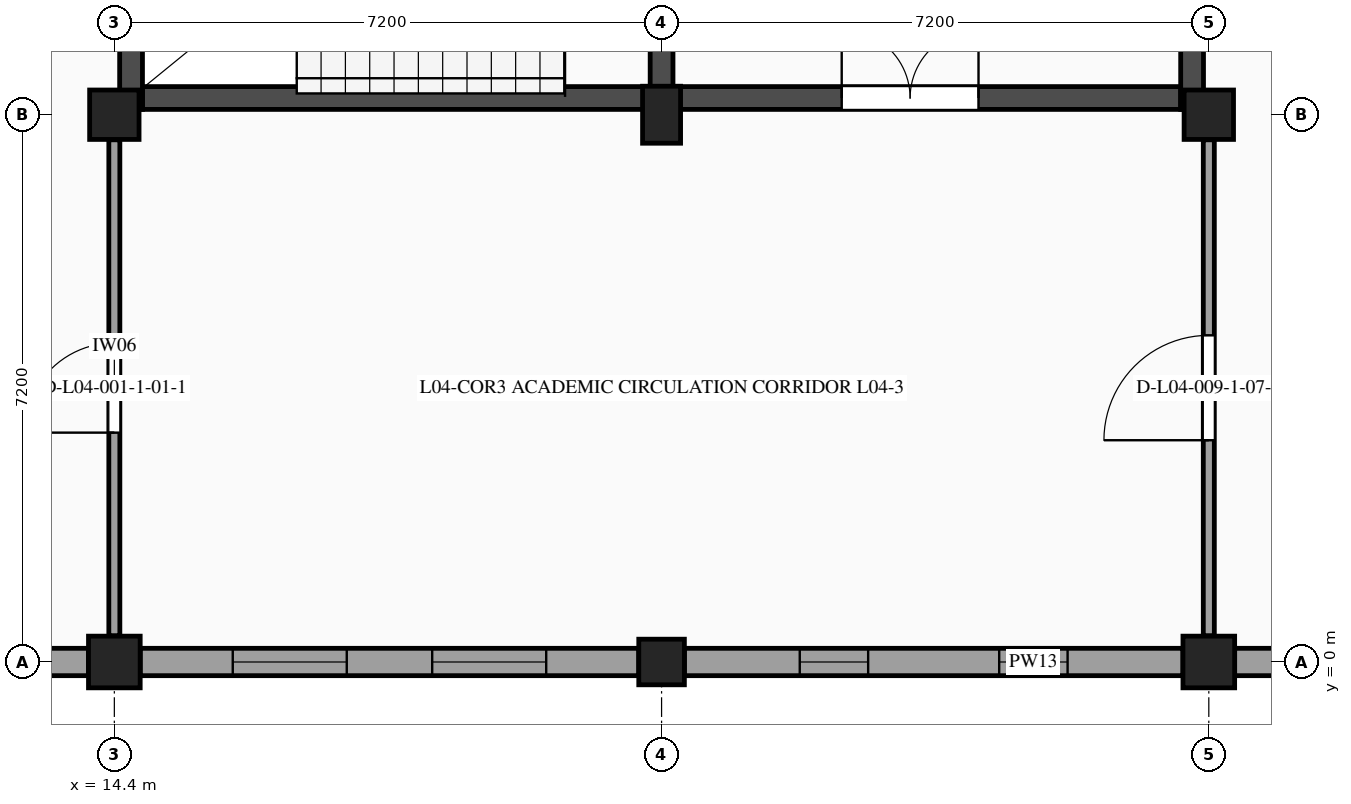
"""IFC4 building model, lengths in metres.
Left out: names, types, materials, properties, quantities, classifications, styles, units other than length and angle.
Written with IfcOpenShell. Run it as: python <this file> out.ifc"""

import sys

from ifc_helpers import new_model, si_unit, direction, frame, frame_2d, origin, origin_2d, place, context, subcontext, project, spatial, rectangle, extrude, element, fill, save


model = new_model("IFC4")
c1 = context("Model", 3, precision=1e-05, world=origin(), true_north=direction((0.0, 1.0)))
c2 = subcontext(c1, "Body", "Model", "MODEL_VIEW")
j1 = project(units=[si_unit("LENGTHUNIT", "METRE"), si_unit("PLANEANGLEUNIT", "RADIAN")], contexts=[c1])
p1 = place(None, origin())
s1 = spatial("IfcSite", under=j1, at=p1, CompositionType="ELEMENT")
p2 = place(p1, origin())
s2 = spatial("IfcBuilding", under=s1, at=p2, CompositionType="ELEMENT")
p3 = place(p2, frame((0.0, 0.0, 18.6)))
s3 = spatial("IfcBuildingStorey", under=s2, at=p3, CompositionType="ELEMENT", Elevation=18.6)
p4 = place(p3, frame((14.4, 0.0, 0.0), z_axis=(0.0, 0.0, 1.0), x_axis=(1.0, 0.0, 0.0)))
e1 = element("IfcColumn", 1, at=p4, inside=s3, PredefinedType="COLUMN", context=c2, shape_type="SweptSolid", body=[
    extrude(rectangle(XDim=0.68, YDim=0.68, at=origin_2d()), origin(), (0.0, 0.0, 1.0), 4.2),
])
p5 = place(p3, frame((14.4, 7.2, 0.0), z_axis=(0.0, 0.0, 1.0), x_axis=(1.0, 0.0, 0.0)))
e2 = element("IfcColumn", 2, at=p5, inside=s3, PredefinedType="COLUMN", context=c2, shape_type="SweptSolid", body=[
    extrude(rectangle(XDim=0.65, YDim=0.65, at=origin_2d()), origin(), (0.0, 0.0, 1.0), 4.2),
])
p6 = place(p3, frame((21.6, 0.0, 0.0), z_axis=(0.0, 0.0, 1.0), x_axis=(1.0, 0.0, 0.0)))
e3 = element("IfcColumn", 3, at=p6, inside=s3, PredefinedType="COLUMN", context=c2, shape_type="SweptSolid", body=[
    extrude(rectangle(XDim=0.6, YDim=0.6, at=origin_2d()), origin(), (0.0, 0.0, 1.0), 4.2),
])
p7 = place(p3, frame((21.6, 7.2, 0.0), z_axis=(0.0, 0.0, 1.0), x_axis=(1.0, 0.0, 0.0)))
e4 = element("IfcColumn", 4, at=p7, inside=s3, PredefinedType="COLUMN", context=c2, shape_type="SweptSolid", body=[
    extrude(rectangle(XDim=0.5, YDim=0.75, at=origin_2d()), origin(), (0.0, 0.0, 1.0), 4.2),
])
p8 = place(p3, frame((28.8, 0.0, 0.0), z_axis=(0.0, 0.0, 1.0), x_axis=(1.0, 0.0, 0.0)))
e5 = element("IfcColumn", 5, at=p8, inside=s3, PredefinedType="COLUMN", context=c2, shape_type="SweptSolid", body=[
    extrude(rectangle(XDim=0.68, YDim=0.68, at=origin_2d()), origin(), (0.0, 0.0, 1.0), 4.2),
])
p9 = place(p3, frame((28.8, 7.2, 0.0), z_axis=(0.0, 0.0, 1.0), x_axis=(1.0, 0.0, 0.0)))
e6 = element("IfcColumn", 6, at=p9, inside=s3, PredefinedType="COLUMN", context=c2, shape_type="SweptSolid", body=[
    extrude(rectangle(XDim=0.65, YDim=0.65, at=origin_2d()), origin(), (0.0, 0.0, 1.0), 4.2),
])
p10 = place(p3, frame((35.7, 0.0, 0.0), z_axis=(0.0, 0.0, 1.0), x_axis=(-1.0, 0.0, 0.0)))
e7 = element("IfcWall", 7, at=p10, inside=s3, PredefinedType="STANDARD", context=c2, shape_type="SweptSolid", body=[
    extrude(rectangle(XDim=6.56, YDim=0.36, at=frame_2d((3.28, 0.0))), origin(), (0.0, 0.0, 1.0), 3.2),
])
p11 = place(p10, frame((1.443, 0.0, 1.15)))
e8 = element("IfcOpeningElement", 8, at=p11, cuts=e7, PredefinedType="OPENING", context=c2, shape_type="SweptSolid", body=[
    extrude(rectangle(XDim=1.05, YDim=1.35, at=frame_2d((0.525, 0.675))), frame((0.0, 0.19, 0.0), z_axis=(0.0, -1.0, 0.0), x_axis=(1.0, 0.0, 0.0)), (0.0, 0.0, 1.0), 0.38),
])
p12 = place(p10, frame((4.067, 0.0, 1.15)))
e9 = element("IfcOpeningElement", 9, at=p12, cuts=e7, PredefinedType="OPENING", context=c2, shape_type="SweptSolid", body=[
    extrude(rectangle(XDim=1.05, YDim=1.35, at=frame_2d((0.525, 0.675))), frame((0.0, 0.19, 0.0), z_axis=(0.0, -1.0, 0.0), x_axis=(1.0, 0.0, 0.0)), (0.0, 0.0, 1.0), 0.38),
])
p13 = place(p3, frame((28.46, 0.0, 0.0), z_axis=(0.0, 0.0, 1.0), x_axis=(-1.0, 0.0, 0.0)))
e10 = element("IfcWall", 10, at=p13, inside=s3, PredefinedType="STANDARD", context=c2, shape_type="SweptSolid", body=[
    extrude(rectangle(XDim=6.56, YDim=0.36, at=frame_2d((3.28, 0.0))), origin(), (0.0, 0.0, 1.0), 3.2),
])
p14 = place(p13, frame((1.518, 0.0, 1.15)))
e11 = element("IfcOpeningElement", 11, at=p14, cuts=e10, PredefinedType="OPENING", context=c2, shape_type="SweptSolid", body=[
    extrude(rectangle(XDim=0.9, YDim=1.3, at=frame_2d((0.45, 0.65))), frame((0.0, 0.19, 0.0), z_axis=(0.0, -1.0, 0.0), x_axis=(1.0, 0.0, 0.0)), (0.0, 0.0, 1.0), 0.38),
])
p15 = place(p13, frame((4.142, 0.0, 1.15)))
e12 = element("IfcOpeningElement", 12, at=p15, cuts=e10, PredefinedType="OPENING", context=c2, shape_type="SweptSolid", body=[
    extrude(rectangle(XDim=0.9, YDim=1.3, at=frame_2d((0.45, 0.65))), frame((0.0, 0.19, 0.0), z_axis=(0.0, -1.0, 0.0), x_axis=(1.0, 0.0, 0.0)), (0.0, 0.0, 1.0), 0.38),
])
p16 = place(p3, frame((21.3, 0.0, 0.0), z_axis=(0.0, 0.0, 1.0), x_axis=(-1.0, 0.0, 0.0)))
e13 = element("IfcWall", 13, at=p16, inside=s3, PredefinedType="STANDARD", context=c2, shape_type="SweptSolid", body=[
    extrude(rectangle(XDim=6.56, YDim=0.36, at=frame_2d((3.28, 0.0))), origin(), (0.0, 0.0, 1.0), 3.2),
])
p17 = place(p16, frame((1.218, 0.0, 1.15)))
e14 = element("IfcOpeningElement", 14, at=p17, cuts=e13, PredefinedType="OPENING", context=c2, shape_type="SweptSolid", body=[
    extrude(rectangle(XDim=1.5, YDim=1.2, at=frame_2d((0.75, 0.6))), frame((0.0, 0.19, 0.0), z_axis=(0.0, -1.0, 0.0), x_axis=(1.0, 0.0, 0.0)), (0.0, 0.0, 1.0), 0.38),
])
p18 = place(p16, frame((3.842, 0.0, 1.15)))
e15 = element("IfcOpeningElement", 15, at=p18, cuts=e13, PredefinedType="OPENING", context=c2, shape_type="SweptSolid", body=[
    extrude(rectangle(XDim=1.5, YDim=1.2, at=frame_2d((0.75, 0.6))), frame((0.0, 0.19, 0.0), z_axis=(0.0, -1.0, 0.0), x_axis=(1.0, 0.0, 0.0)), (0.0, 0.0, 1.0), 0.38),
])
p19 = place(p3, frame((14.06, 0.0, 0.0), z_axis=(0.0, 0.0, 1.0), x_axis=(-1.0, 0.0, 0.0)))
e16 = element("IfcWall", 16, at=p19, inside=s3, PredefinedType="STANDARD", context=c2, shape_type="SweptSolid", body=[
    extrude(rectangle(XDim=6.56, YDim=0.36, at=frame_2d((3.28, 0.0))), origin(), (0.0, 0.0, 1.0), 3.2),
])
p20 = place(p19, frame((1.293, 0.0, 1.15)))
e17 = element("IfcOpeningElement", 17, at=p20, cuts=e16, PredefinedType="OPENING", context=c2, shape_type="SweptSolid", body=[
    extrude(rectangle(XDim=1.35, YDim=1.1, at=frame_2d((0.675, 0.55))), frame((0.0, 0.19, 0.0), z_axis=(0.0, -1.0, 0.0), x_axis=(1.0, 0.0, 0.0)), (0.0, 0.0, 1.0), 0.38),
])
p21 = place(p19, frame((3.917, 0.0, 1.15)))
e18 = element("IfcOpeningElement", 18, at=p21, cuts=e16, PredefinedType="OPENING", context=c2, shape_type="SweptSolid", body=[
    extrude(rectangle(XDim=1.35, YDim=1.1, at=frame_2d((0.675, 0.55))), frame((0.0, 0.19, 0.0), z_axis=(0.0, -1.0, 0.0), x_axis=(1.0, 0.0, 0.0)), (0.0, 0.0, 1.0), 0.38),
])
p22 = place(p3, frame((14.77, 7.42, 0.0), z_axis=(0.0, 0.0, 1.0), x_axis=(1.0, 0.0, 0.0)))
e19 = element("IfcWall", 19, at=p22, inside=s3, PredefinedType="SHEAR", context=c2, shape_type="SweptSolid", body=[
    extrude(rectangle(XDim=6.68, YDim=0.3, at=frame_2d((3.34, 0.0))), origin(), (0.0, 0.0, 1.0), 3.955),
])
p23 = place(p3, frame((14.62, 14.33, 0.0), z_axis=(0.0, 0.0, 1.0), x_axis=(0.0, -1.0, 0.0)))
e20 = element("IfcWall", 20, at=p23, inside=s3, PredefinedType="SHEAR", context=c2, shape_type="SweptSolid", body=[
    extrude(rectangle(XDim=7.06, YDim=0.3, at=frame_2d((3.53, 0.0))), origin(), (0.0, 0.0, 1.0), 3.955),
])
p24 = place(p3, frame((21.6, 7.27, 0.0), z_axis=(0.0, 0.0, 1.0), x_axis=(0.0, 1.0, 0.0)))
e21 = element("IfcWall", 21, at=p24, inside=s3, PredefinedType="SHEAR", context=c2, shape_type="SweptSolid", body=[
    extrude(rectangle(XDim=7.06, YDim=0.3, at=frame_2d((3.53, 0.0))), origin(), (0.0, 0.0, 1.0), 3.955),
])
p25 = place(p24, frame((1.4, 0.0, 0.0)))
e22 = element("IfcOpeningElement", 22, at=p25, cuts=e21, PredefinedType="OPENING", context=c2, shape_type="SweptSolid", body=[
    extrude(rectangle(XDim=1.8, YDim=2.2, at=frame_2d((0.9, 1.1))), frame((0.0, 0.16, 0.0), z_axis=(0.0, -1.0, 0.0), x_axis=(1.0, 0.0, 0.0)), (0.0, 0.0, 1.0), 0.32),
])
p26 = place(p3, frame((21.75, 7.42, 0.0), z_axis=(0.0, 0.0, 1.0), x_axis=(1.0, 0.0, 0.0)))
e23 = element("IfcWall", 23, at=p26, inside=s3, PredefinedType="SHEAR", context=c2, shape_type="SweptSolid", body=[
    extrude(rectangle(XDim=6.68, YDim=0.3, at=frame_2d((3.34, 0.0))), origin(), (0.0, 0.0, 1.0), 3.955),
])
p27 = place(p26, frame((2.22, 0.0, 0.0)))
e24 = element("IfcOpeningElement", 24, at=p27, cuts=e23, PredefinedType="OPENING", context=c2, shape_type="SweptSolid", body=[
    extrude(rectangle(XDim=1.8, YDim=2.2, at=frame_2d((0.9, 1.1))), frame((0.0, 0.16, 0.0), z_axis=(0.0, -1.0, 0.0), x_axis=(1.0, 0.0, 0.0)), (0.0, 0.0, 1.0), 0.32),
])
p28 = place(p3, frame((28.58, 7.27, 0.0), z_axis=(0.0, 0.0, 1.0), x_axis=(0.0, 1.0, 0.0)))
e25 = element("IfcWall", 25, at=p28, inside=s3, PredefinedType="SHEAR", context=c2, shape_type="SweptSolid", body=[
    extrude(rectangle(XDim=7.06, YDim=0.3, at=frame_2d((3.53, 0.0))), origin(), (0.0, 0.0, 1.0), 3.955),
])
p29 = place(p3, frame((14.4, 0.345, 0.0), z_axis=(0.0, 0.0, 1.0), x_axis=(0.0, 1.0, 0.0)))
e26 = element("IfcWall", 26, at=p29, inside=s3, PredefinedType="PARTITIONING", context=c2, shape_type="SweptSolid", body=[
    extrude(rectangle(XDim=6.525, YDim=0.145, at=frame_2d((3.263, 0.0))), origin(), (0.0, 0.0, 1.0), 3.26),
])
p30 = place(p29, frame((2.673, 0.0, 0.0)))
e27 = element("IfcOpeningElement", 27, at=p30, cuts=e26, PredefinedType="OPENING", context=c2, shape_type="SweptSolid", body=[
    extrude(rectangle(XDim=1.18, YDim=2.18, at=frame_2d((0.59, 1.09))), frame((0.0, 0.083, 0.0), z_axis=(0.0, -1.0, 0.0), x_axis=(1.0, 0.0, 0.0)), (0.0, 0.0, 1.0), 0.165),
])
p31 = place(p3, frame((28.8, 0.345, 0.0), z_axis=(0.0, 0.0, 1.0), x_axis=(0.0, 1.0, 0.0)))
e28 = element("IfcWall", 28, at=p31, inside=s3, PredefinedType="PARTITIONING", context=c2, shape_type="SweptSolid", body=[
    extrude(rectangle(XDim=6.525, YDim=0.145, at=frame_2d((3.263, 0.0))), origin(), (0.0, 0.0, 1.0), 3.26),
])
p32 = place(p31, frame((2.573, 0.0, 0.0)))
e29 = element("IfcOpeningElement", 29, at=p32, cuts=e28, PredefinedType="OPENING", context=c2, shape_type="SweptSolid", body=[
    extrude(rectangle(XDim=1.38, YDim=2.22, at=frame_2d((0.69, 1.11))), frame((0.0, 0.083, 0.0), z_axis=(0.0, -1.0, 0.0), x_axis=(1.0, 0.0, 0.0)), (0.0, 0.0, 1.0), 0.165),
])
p33 = place(p14, origin())
e30 = element("IfcWindow", 30, at=p33, inside=s3, PartitioningType="SINGLE_PANEL", PredefinedType="WINDOW", context=c2, shape_type="SweptSolid", body=[
    extrude(rectangle(XDim=0.9, YDim=1.3, at=frame_2d((0.45, 0.65))), frame((0.0, -0.08, 0.0), z_axis=(0.0, -1.0, 0.0), x_axis=(1.0, 0.0, 0.0)), (0.0, 0.0, 1.0), 0.06),
])
fill(e11, e30)
p34 = place(p15, origin())
e31 = element("IfcWindow", 31, at=p34, inside=s3, PartitioningType="SINGLE_PANEL", PredefinedType="WINDOW", context=c2, shape_type="SweptSolid", body=[
    extrude(rectangle(XDim=0.9, YDim=1.3, at=frame_2d((0.45, 0.65))), frame((0.0, -0.08, 0.0), z_axis=(0.0, -1.0, 0.0), x_axis=(1.0, 0.0, 0.0)), (0.0, 0.0, 1.0), 0.06),
])
fill(e12, e31)
p35 = place(p17, origin())
e32 = element("IfcWindow", 32, at=p35, inside=s3, PartitioningType="SINGLE_PANEL", PredefinedType="WINDOW", context=c2, shape_type="SweptSolid", body=[
    extrude(rectangle(XDim=1.5, YDim=1.2, at=frame_2d((0.75, 0.6))), frame((0.0, -0.08, 0.0), z_axis=(0.0, -1.0, 0.0), x_axis=(1.0, 0.0, 0.0)), (0.0, 0.0, 1.0), 0.06),
])
fill(e14, e32)
p36 = place(p18, origin())
e33 = element("IfcWindow", 33, at=p36, inside=s3, PartitioningType="SINGLE_PANEL", PredefinedType="WINDOW", context=c2, shape_type="SweptSolid", body=[
    extrude(rectangle(XDim=1.5, YDim=1.2, at=frame_2d((0.75, 0.6))), frame((0.0, -0.08, 0.0), z_axis=(0.0, -1.0, 0.0), x_axis=(1.0, 0.0, 0.0)), (0.0, 0.0, 1.0), 0.06),
])
fill(e15, e33)
p37 = place(p27, origin())
e34 = element("IfcDoor", 34, at=p37, inside=s3, OperationType="DOUBLE_DOOR_SINGLE_SWING", PredefinedType="DOOR", context=c2, shape_type="SweptSolid", body=[
    extrude(rectangle(XDim=1.8, YDim=2.2, at=frame_2d((0.9, 1.1))), frame((0.0, 0.025, 0.0), z_axis=(0.0, -1.0, 0.0), x_axis=(1.0, 0.0, 0.0)), (0.0, 0.0, 1.0), 0.05),
])
fill(e24, e34)
p38 = place(p30, origin())
e35 = element("IfcDoor", 35, at=p38, inside=s3, OperationType="SINGLE_SWING_LEFT", PredefinedType="DOOR", context=c2, shape_type="SweptSolid", body=[
    extrude(rectangle(XDim=1.18, YDim=2.18, at=frame_2d((0.59, 1.09))), frame((0.0, 0.025, 0.0), z_axis=(0.0, -1.0, 0.0), x_axis=(1.0, 0.0, 0.0)), (0.0, 0.0, 1.0), 0.05),
])
fill(e27, e35)
p39 = place(p32, origin())
e36 = element("IfcDoor", 36, at=p39, inside=s3, OperationType="SINGLE_SWING_LEFT", PredefinedType="DOOR", context=c2, shape_type="SweptSolid", body=[
    extrude(rectangle(XDim=1.38, YDim=2.22, at=frame_2d((0.69, 1.11))), frame((0.0, 0.025, 0.0), z_axis=(0.0, -1.0, 0.0), x_axis=(1.0, 0.0, 0.0)), (0.0, 0.0, 1.0), 0.05),
])
fill(e29, e36)
save(model, sys.argv[1])
